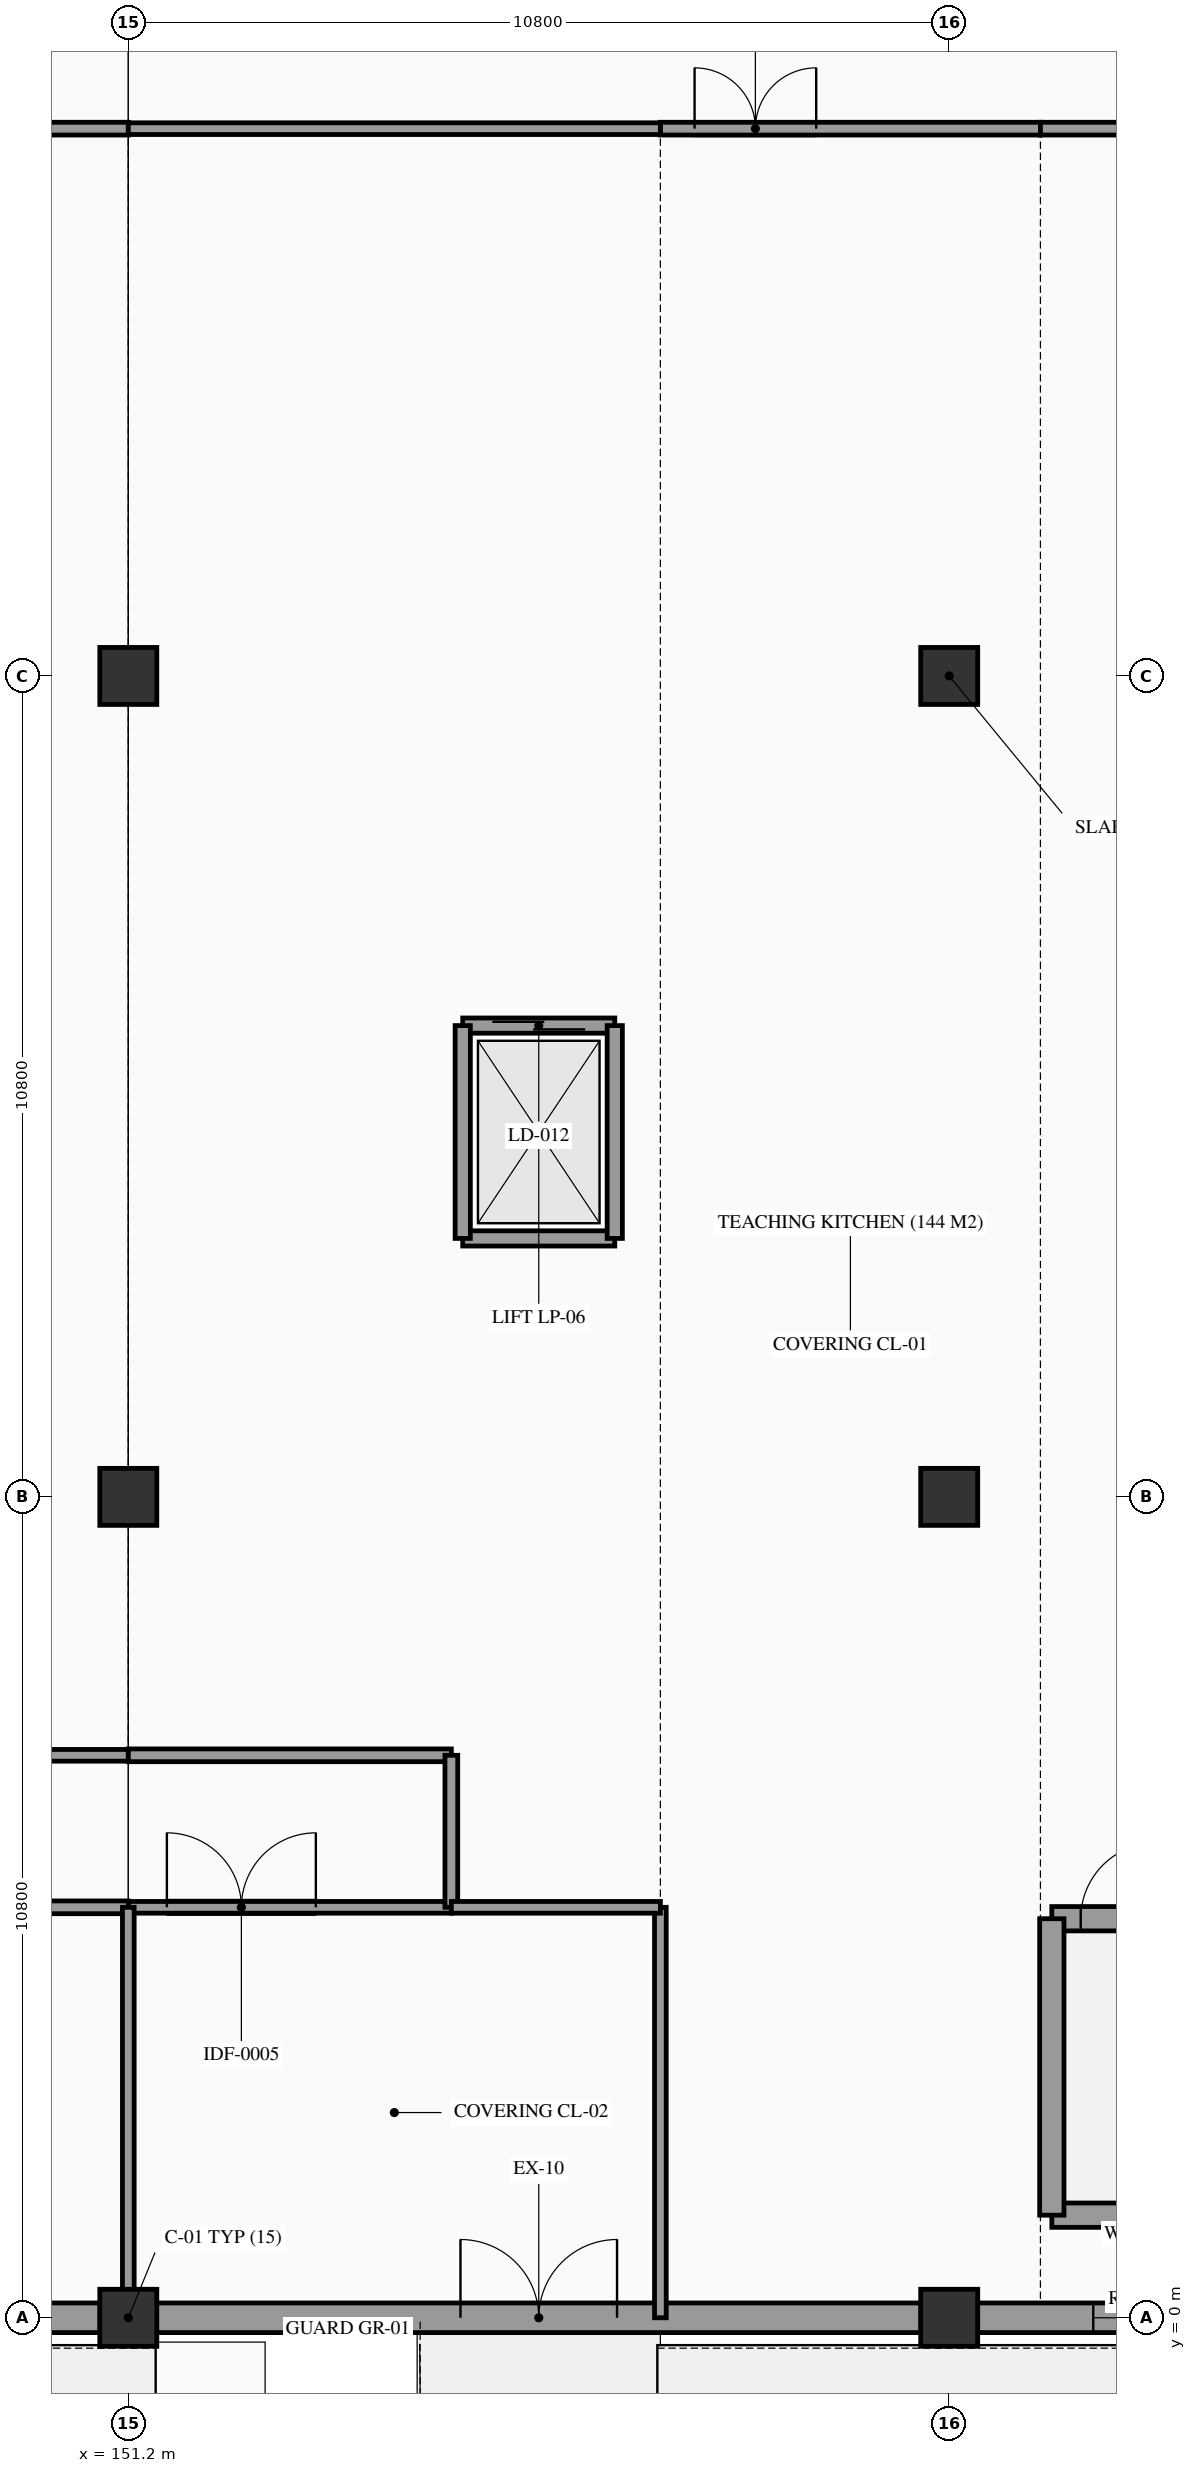
"""IFC4 building model, lengths in metres.
Left out: names, types, materials, properties, quantities, classifications, styles, units other than length and angle.
Written with IfcOpenShell. Run it as: python <this file> out.ifc"""

import sys

from ifc_helpers import new_model, si_unit, direction, frame, frame_2d, origin, origin_2d, place, context, subcontext, project, spatial, rectangle, extrude, element, fill, save


model = new_model("IFC4")
c1 = context("Model", 3, precision=1e-05, world=origin(), true_north=direction((0.0, 1.0)))
c2 = subcontext(c1, "Body", "Model", "MODEL_VIEW")
j1 = project(units=[si_unit("LENGTHUNIT", "METRE"), si_unit("PLANEANGLEUNIT", "RADIAN")], contexts=[c1])
p1 = place(None, origin())
s1 = spatial("IfcSite", under=j1, at=p1, CompositionType="ELEMENT")
p2 = place(p1, origin())
s2 = spatial("IfcBuilding", under=s1, at=p2, CompositionType="ELEMENT")
p3 = place(p2, origin())
s3 = spatial("IfcBuildingStorey", under=s2, at=p3, CompositionType="ELEMENT", Elevation=0.0)
for number, where, z_axis, x_axis in (
    (1, (151.2, 0.0, -1.2), (0.0, 0.0, 1.0), (1.0, 0.0, 0.0)),
    (2, (151.2, 10.8, -1.2), (0.0, 0.0, 1.0), (1.0, 0.0, 0.0)),
    (3, (151.2, 21.6, -1.2), (0.0, 0.0, 1.0), (1.0, 0.0, 0.0)),
    (4, (162.0, 0.0, -1.2), (0.0, 0.0, 1.0), (1.0, 0.0, 0.0)),
    (5, (162.0, 10.8, -1.2), (0.0, 0.0, 1.0), (1.0, 0.0, 0.0)),
    (6, (162.0, 21.6, -1.2), (0.0, 0.0, 1.0), (1.0, 0.0, 0.0)),
):
    element("IfcColumn", number, at=place(p3, frame(where, z_axis=z_axis, x_axis=x_axis)), inside=s3, PredefinedType="COLUMN", context=c2, shape_type="SweptSolid", body=[
        extrude(rectangle(XDim=0.75, YDim=0.75, at=origin_2d()), origin(), (0.0, 0.0, 1.0), 6.6),
    ])
p4 = place(p3, frame((108.45, 0.0, -1.2), z_axis=(0.0, 0.0, 1.0), x_axis=(1.0, 0.0, 0.0)))
e7 = element("IfcWall", 7, at=p4, inside=s3, PredefinedType="USERDEFINED", context=c2, shape_type="SweptSolid", body=[
    extrude(rectangle(XDim=107.1, YDim=0.334, at=frame_2d((53.55, 0.0))), origin(), (0.0, 0.0, 1.0), 0.14),
])
p5 = place(p3, frame((140.77, 0.0, 0.0), z_axis=(0.0, 0.0, 1.0), x_axis=(1.0, 0.0, 0.0)))
e8 = element("IfcWall", 8, at=p5, inside=s3, PredefinedType="STANDARD", context=c2, shape_type="SweptSolid", body=[
    extrude(rectangle(XDim=10.06, YDim=0.39, at=frame_2d((5.03, 0.0))), origin(), (0.0, 0.0, 1.0), 4.198),
])
p6 = place(p5, frame((1.225, 0.0, 0.95)))
e9 = element("IfcOpeningElement", 9, at=p6, cuts=e8, PredefinedType="OPENING", context=c2, shape_type="SweptSolid", body=[
    extrude(rectangle(XDim=1.65, YDim=1.2, at=frame_2d((0.825, 0.6))), frame((0.0, 0.205, 0.0), z_axis=(0.0, -1.0, 0.0), x_axis=(1.0, 0.0, 0.0)), (0.0, 0.0, 1.0), 0.41),
])
p7 = place(p5, frame((4.095, 0.0, 0.95)))
e10 = element("IfcOpeningElement", 10, at=p7, cuts=e8, PredefinedType="OPENING", context=c2, shape_type="SweptSolid", body=[
    extrude(rectangle(XDim=1.77, YDim=1.2, at=frame_2d((0.885, 0.6))), frame((0.0, 0.205, 0.0), z_axis=(0.0, -1.0, 0.0), x_axis=(1.0, 0.0, 0.0)), (0.0, 0.0, 1.0), 0.41),
])
p8 = place(p5, frame((6.965, 0.0, 0.95)))
e11 = element("IfcOpeningElement", 11, at=p8, cuts=e8, PredefinedType="OPENING", context=c2, shape_type="SweptSolid", body=[
    extrude(rectangle(XDim=1.89, YDim=1.2, at=frame_2d((0.945, 0.6))), frame((0.0, 0.205, 0.0), z_axis=(0.0, -1.0, 0.0), x_axis=(1.0, 0.0, 0.0)), (0.0, 0.0, 1.0), 0.41),
])
p9 = place(p3, frame((151.57, 0.0, 0.0), z_axis=(0.0, 0.0, 1.0), x_axis=(1.0, 0.0, 0.0)))
e12 = element("IfcWall", 12, at=p9, inside=s3, PredefinedType="STANDARD", context=c2, shape_type="SweptSolid", body=[
    extrude(rectangle(XDim=10.06, YDim=0.39, at=frame_2d((5.03, 0.0))), origin(), (0.0, 0.0, 1.0), 4.198),
])
p10 = place(p9, frame((4.0, 0.0, 0.0)))
e13 = element("IfcOpeningElement", 13, at=p10, cuts=e12, PredefinedType="OPENING", context=c2, shape_type="SweptSolid", body=[
    extrude(rectangle(XDim=2.06, YDim=2.4, at=frame_2d((1.03, 1.2))), frame((0.0, 0.205, 0.0), z_axis=(0.0, -1.0, 0.0), x_axis=(1.0, 0.0, 0.0)), (0.0, 0.0, 1.0), 0.41),
])
p11 = place(p3, frame((162.37, 0.0, 0.0), z_axis=(0.0, 0.0, 1.0), x_axis=(1.0, 0.0, 0.0)))
e14 = element("IfcWall", 14, at=p11, inside=s3, PredefinedType="STANDARD", context=c2, shape_type="SweptSolid", body=[
    extrude(rectangle(XDim=10.06, YDim=0.39, at=frame_2d((5.03, 0.0))), origin(), (0.0, 0.0, 1.0), 4.198),
])
p12 = place(p11, frame((1.525, 0.0, 0.95)))
e15 = element("IfcOpeningElement", 15, at=p12, cuts=e14, PredefinedType="OPENING", context=c2, shape_type="SweptSolid", body=[
    extrude(rectangle(XDim=1.05, YDim=1.35, at=frame_2d((0.525, 0.675))), frame((0.0, 0.205, 0.0), z_axis=(0.0, -1.0, 0.0), x_axis=(1.0, 0.0, 0.0)), (0.0, 0.0, 1.0), 0.41),
])
p13 = place(p11, frame((4.395, 0.0, 0.95)))
e16 = element("IfcOpeningElement", 16, at=p13, cuts=e14, PredefinedType="OPENING", context=c2, shape_type="SweptSolid", body=[
    extrude(rectangle(XDim=1.17, YDim=1.35, at=frame_2d((0.585, 0.675))), frame((0.0, 0.205, 0.0), z_axis=(0.0, -1.0, 0.0), x_axis=(1.0, 0.0, 0.0)), (0.0, 0.0, 1.0), 0.41),
])
p14 = place(p11, frame((7.265, 0.0, 0.95)))
e17 = element("IfcOpeningElement", 17, at=p14, cuts=e14, PredefinedType="OPENING", context=c2, shape_type="SweptSolid", body=[
    extrude(rectangle(XDim=1.29, YDim=1.35, at=frame_2d((0.645, 0.675))), frame((0.0, 0.205, 0.0), z_axis=(0.0, -1.0, 0.0), x_axis=(1.0, 0.0, 0.0)), (0.0, 0.0, 1.0), 0.41),
])
p15 = place(p3, frame((163.35, 1.35, 0.0), z_axis=(0.0, 0.0, 1.0), x_axis=(1.0, 0.0, 0.0)))
e18 = element("IfcWall", 18, at=p15, inside=s3, PredefinedType="SHEAR", context=c2, shape_type="SweptSolid", body=[
    extrude(rectangle(XDim=7.9, YDim=0.32, at=frame_2d((3.95, 0.0))), origin(), (0.0, 0.0, 1.0), 5.4),
])
p16 = place(p3, frame((163.35, 5.25, 0.0), z_axis=(0.0, 0.0, 1.0), x_axis=(1.0, 0.0, 0.0)))
e19 = element("IfcWall", 19, at=p16, inside=s3, PredefinedType="SHEAR", context=c2, shape_type="SweptSolid", body=[
    extrude(rectangle(XDim=7.9, YDim=0.32, at=frame_2d((3.95, 0.0))), origin(), (0.0, 0.0, 1.0), 5.4),
])
p17 = place(p16, frame((0.38, 0.0, 0.0)))
e20 = element("IfcOpeningElement", 20, at=p17, cuts=e19, PredefinedType="OPENING", context=c2, shape_type="SweptSolid", body=[
    extrude(rectangle(XDim=1.0, YDim=2.15, at=frame_2d((0.5, 1.075))), frame((0.0, 0.17, 0.0), z_axis=(0.0, -1.0, 0.0), x_axis=(1.0, 0.0, 0.0)), (0.0, 0.0, 1.0), 0.34),
])
p18 = place(p3, frame((163.35, 1.35, 0.0), z_axis=(0.0, 0.0, 1.0), x_axis=(0.0, 1.0, 0.0)))
e21 = element("IfcWall", 21, at=p18, inside=s3, PredefinedType="SHEAR", context=c2, shape_type="SweptSolid", body=[
    extrude(rectangle(XDim=3.9, YDim=0.32, at=frame_2d((1.95, 0.0))), origin(), (0.0, 0.0, 1.0), 5.4),
])
p19 = place(p3, frame((155.6, 14.2, 0.0), z_axis=(0.0, 0.0, 1.0), x_axis=(1.0, 0.0, 0.0)))
e22 = element("IfcWall", 22, at=p19, inside=s3, PredefinedType="SOLIDWALL", context=c2, shape_type="SweptSolid", body=[
    extrude(rectangle(XDim=2.0, YDim=0.2, at=frame_2d((1.0, 0.0))), origin(), (0.0, 0.0, 1.0), 4.22),
])
p20 = place(p3, frame((155.6, 17.0, 0.0), z_axis=(0.0, 0.0, 1.0), x_axis=(1.0, 0.0, 0.0)))
e23 = element("IfcWall", 23, at=p20, inside=s3, PredefinedType="SOLIDWALL", context=c2, shape_type="SweptSolid", body=[
    extrude(rectangle(XDim=2.0, YDim=0.2, at=frame_2d((1.0, 0.0))), origin(), (0.0, 0.0, 1.0), 4.22),
])
p21 = place(p20, frame((0.39, 0.0, 0.0)))
e24 = element("IfcOpeningElement", 24, at=p21, cuts=e23, PredefinedType="OPENING", context=c2, shape_type="SweptSolid", body=[
    extrude(rectangle(XDim=1.22, YDim=2.2, at=frame_2d((0.61, 1.1))), frame((0.0, 0.11, 0.0), z_axis=(0.0, -1.0, 0.0), x_axis=(1.0, 0.0, 0.0)), (0.0, 0.0, 1.0), 0.22),
])
for number, where, z_axis, x_axis in (
    (25, (155.6, 14.2, 0.0), (0.0, 0.0, 1.0), (0.0, 1.0, 0.0)),
    (26, (157.6, 14.2, 0.0), (0.0, 0.0, 1.0), (0.0, 1.0, 0.0)),
):
    element("IfcWall", number, at=place(p3, frame(where, z_axis=z_axis, x_axis=x_axis)), inside=s3, PredefinedType="SOLIDWALL", context=c2, shape_type="SweptSolid", body=[
        extrude(rectangle(XDim=2.8, YDim=0.2, at=frame_2d((1.4, 0.0))), origin(), (0.0, 0.0, 1.0), 4.22),
    ])
p22 = place(p3, frame((151.2, 5.4, 0.0), z_axis=(0.0, 0.0, 1.0), x_axis=(1.0, 0.0, 0.0)))
e27 = element("IfcWall", 27, at=p22, inside=s3, PredefinedType="PARTITIONING", context=c2, shape_type="SweptSolid", body=[
    extrude(rectangle(XDim=4.25, YDim=0.154, at=frame_2d((2.125, 0.0))), origin(), (0.0, 0.0, 1.0), 3.95),
])
p23 = place(p22, frame((0.508, 0.0, 0.0)))
e28 = element("IfcOpeningElement", 28, at=p23, cuts=e27, PredefinedType="OPENING", context=c2, shape_type="SweptSolid", body=[
    extrude(rectangle(XDim=1.96, YDim=2.3, at=frame_2d((0.98, 1.15))), frame((0.0, 0.087, 0.0), z_axis=(0.0, -1.0, 0.0), x_axis=(1.0, 0.0, 0.0)), (0.0, 0.0, 1.0), 0.174),
])
p24 = place(p3, frame((129.6, 7.4, 0.0), z_axis=(0.0, 0.0, 1.0), x_axis=(1.0, 0.0, 0.0)))
e29 = element("IfcWall", 29, at=p24, inside=s3, PredefinedType="PARTITIONING", context=c2, shape_type="SweptSolid", body=[
    extrude(rectangle(XDim=21.6, YDim=0.154, at=frame_2d((10.8, 0.0))), origin(), (0.0, 0.0, 1.0), 3.95),
])
p25 = place(p3, frame((129.6, 28.8, 0.0), z_axis=(0.0, 0.0, 1.0), x_axis=(1.0, 0.0, 0.0)))
e30 = element("IfcWall", 30, at=p25, inside=s3, PredefinedType="PARTITIONING", context=c2, shape_type="SweptSolid", body=[
    extrude(rectangle(XDim=21.6, YDim=0.168, at=frame_2d((10.8, 0.0))), origin(), (0.0, 0.0, 1.0), 3.95),
])
p26 = place(p25, frame((18.098, 0.0, 0.0)))
e31 = element("IfcOpeningElement", 31, at=p26, cuts=e30, PredefinedType="OPENING", context=c2, shape_type="SweptSolid", body=[
    extrude(rectangle(XDim=1.82, YDim=2.25, at=frame_2d((0.91, 1.125))), frame((0.0, 0.094, 0.0), z_axis=(0.0, -1.0, 0.0), x_axis=(1.0, 0.0, 0.0)), (0.0, 0.0, 1.0), 0.188),
])
p27 = place(p3, frame((158.2, 0.0, 0.0), z_axis=(0.0, 0.0, 1.0), x_axis=(0.0, 1.0, 0.0)))
e32 = element("IfcWall", 32, at=p27, inside=s3, PredefinedType="PARTITIONING", context=c2, shape_type="SweptSolid", body=[
    extrude(rectangle(XDim=5.4, YDim=0.154, at=frame_2d((2.7, 0.0))), origin(), (0.0, 0.0, 1.0), 3.95),
])
p28 = place(p3, frame((158.2, 28.8, 0.0), z_axis=(0.0, 0.0, 1.0), x_axis=(1.0, 0.0, 0.0)))
e33 = element("IfcWall", 33, at=p28, inside=s3, PredefinedType="PARTITIONING", context=c2, shape_type="SweptSolid", body=[
    extrude(rectangle(XDim=5.0, YDim=0.168, at=frame_2d((2.5, 0.0))), origin(), (0.0, 0.0, 1.0), 3.95),
])
p29 = place(p28, frame((0.45, 0.0, 0.0)))
e34 = element("IfcOpeningElement", 34, at=p29, cuts=e33, PredefinedType="OPENING", context=c2, shape_type="SweptSolid", body=[
    extrude(rectangle(XDim=1.6, YDim=2.2, at=frame_2d((0.8, 1.1))), frame((0.0, 0.094, 0.0), z_axis=(0.0, -1.0, 0.0), x_axis=(1.0, 0.0, 0.0)), (0.0, 0.0, 1.0), 0.188),
])
p30 = place(p3, frame((149.27, 5.4, 0.0), z_axis=(0.0, 0.0, 1.0), x_axis=(1.0, 0.0, 0.0)))
e35 = element("IfcWall", 35, at=p30, inside=s3, PredefinedType="PARTITIONING", context=c2, shape_type="SweptSolid", body=[
    extrude(rectangle(XDim=1.93, YDim=0.168, at=frame_2d((0.965, 0.0))), origin(), (0.0, 0.0, 1.0), 3.95),
])
p31 = place(p3, frame((151.2, 0.0, 0.0), z_axis=(0.0, 0.0, 1.0), x_axis=(0.0, 1.0, 0.0)))
e36 = element("IfcWall", 36, at=p31, inside=s3, PredefinedType="PARTITIONING", context=c2, shape_type="SweptSolid", body=[
    extrude(rectangle(XDim=5.4, YDim=0.154, at=frame_2d((2.7, 0.0))), origin(), (0.0, 0.0, 1.0), 3.95),
])
p32 = place(p3, frame((151.2, 7.4, 0.0), z_axis=(0.0, 0.0, 1.0), x_axis=(1.0, 0.0, 0.0)))
e37 = element("IfcWall", 37, at=p32, inside=s3, PredefinedType="PARTITIONING", context=c2, shape_type="SweptSolid", body=[
    extrude(rectangle(XDim=4.25, YDim=0.168, at=frame_2d((2.125, 0.0))), origin(), (0.0, 0.0, 1.0), 3.95),
])
p33 = place(p3, frame((151.2, 28.8, 0.0), z_axis=(0.0, 0.0, 1.0), x_axis=(1.0, 0.0, 0.0)))
e38 = element("IfcWall", 38, at=p33, inside=s3, PredefinedType="PARTITIONING", context=c2, shape_type="SweptSolid", body=[
    extrude(rectangle(XDim=7.0, YDim=0.154, at=frame_2d((3.5, 0.0))), origin(), (0.0, 0.0, 1.0), 3.95),
])
p34 = place(p3, frame((155.45, 5.4, 0.0), z_axis=(0.0, 0.0, 1.0), x_axis=(0.0, 1.0, 0.0)))
e39 = element("IfcWall", 39, at=p34, inside=s3, PredefinedType="PARTITIONING", context=c2, shape_type="SweptSolid", body=[
    extrude(rectangle(XDim=2.0, YDim=0.168, at=frame_2d((1.0, 0.0))), origin(), (0.0, 0.0, 1.0), 3.95),
])
p35 = place(p3, frame((155.45, 5.4, 0.0), z_axis=(0.0, 0.0, 1.0), x_axis=(1.0, 0.0, 0.0)))
e40 = element("IfcWall", 40, at=p35, inside=s3, PredefinedType="PARTITIONING", context=c2, shape_type="SweptSolid", body=[
    extrude(rectangle(XDim=2.75, YDim=0.154, at=frame_2d((1.375, 0.0))), origin(), (0.0, 0.0, 1.0), 3.95),
])
p36 = place(p3, frame((163.2, 28.8, 0.0), z_axis=(0.0, 0.0, 1.0), x_axis=(1.0, 0.0, 0.0)))
e41 = element("IfcWall", 41, at=p36, inside=s3, PredefinedType="PARTITIONING", context=c2, shape_type="SweptSolid", body=[
    extrude(rectangle(XDim=9.6, YDim=0.168, at=frame_2d((4.8, 0.0))), origin(), (0.0, 0.0, 1.0), 3.95),
])
p37 = place(p10, frame((2.06, 0.0, 0.0), z_axis=(0.0, 0.0, 1.0), x_axis=(-1.0, 0.0, 0.0)))
e42 = element("IfcDoor", 42, at=p37, inside=s3, OperationType="DOUBLE_DOOR_SINGLE_SWING", PredefinedType="DOOR", context=c2, shape_type="SweptSolid", body=[
    extrude(rectangle(XDim=2.06, YDim=2.4, at=frame_2d((1.03, 1.2))), frame((0.0, 0.025, 0.0), z_axis=(0.0, -1.0, 0.0), x_axis=(1.0, 0.0, 0.0)), (0.0, 0.0, 1.0), 0.05),
])
fill(e13, e42)
p38 = place(p12, frame((1.05, 0.0, 0.0), z_axis=(0.0, 0.0, 1.0), x_axis=(-1.0, 0.0, 0.0)))
e43 = element("IfcWindow", 43, at=p38, inside=s3, PartitioningType="SINGLE_PANEL", PredefinedType="WINDOW", context=c2, shape_type="SweptSolid", body=[
    extrude(rectangle(XDim=1.05, YDim=1.35, at=frame_2d((0.525, 0.675))), frame((0.0, 0.03, 0.0), z_axis=(0.0, -1.0, 0.0), x_axis=(1.0, 0.0, 0.0)), (0.0, 0.0, 1.0), 0.06),
])
fill(e15, e43)
p39 = place(p17, frame((1.0, 0.0, 0.0), z_axis=(0.0, 0.0, 1.0), x_axis=(-1.0, 0.0, 0.0)))
e44 = element("IfcDoor", 44, at=p39, inside=s3, OperationType="SINGLE_SWING_RIGHT", PredefinedType="DOOR", context=c2, shape_type="SweptSolid", body=[
    extrude(rectangle(XDim=1.0, YDim=2.15, at=frame_2d((0.5, 1.075))), frame((0.0, 0.025, 0.0), z_axis=(0.0, -1.0, 0.0), x_axis=(1.0, 0.0, 0.0)), (0.0, 0.0, 1.0), 0.05),
])
fill(e20, e44)
p40 = place(p21, origin())
e45 = element("IfcDoor", 45, at=p40, inside=s3, OperationType="DOUBLE_DOOR_SLIDING", PredefinedType="DOOR", context=c2, shape_type="SweptSolid", body=[
    extrude(rectangle(XDim=1.22, YDim=2.2, at=frame_2d((0.61, 1.1))), frame((0.0, 0.025, 0.0), z_axis=(0.0, -1.0, 0.0), x_axis=(1.0, 0.0, 0.0)), (0.0, 0.0, 1.0), 0.05),
])
fill(e24, e45)
p41 = place(p23, origin())
e46 = element("IfcDoor", 46, at=p41, inside=s3, OperationType="DOUBLE_DOOR_SINGLE_SWING", PredefinedType="DOOR", context=c2, shape_type="SweptSolid", body=[
    extrude(rectangle(XDim=1.96, YDim=2.3, at=frame_2d((0.98, 1.15))), frame((0.0, 0.025, 0.0), z_axis=(0.0, -1.0, 0.0), x_axis=(1.0, 0.0, 0.0)), (0.0, 0.0, 1.0), 0.05),
])
fill(e28, e46)
p42 = place(p29, origin())
e47 = element("IfcDoor", 47, at=p42, inside=s3, OperationType="DOUBLE_DOOR_SINGLE_SWING", PredefinedType="DOOR", context=c2, shape_type="SweptSolid", body=[
    extrude(rectangle(XDim=1.6, YDim=2.2, at=frame_2d((0.8, 1.1))), frame((0.0, 0.025, 0.0), z_axis=(0.0, -1.0, 0.0), x_axis=(1.0, 0.0, 0.0)), (0.0, 0.0, 1.0), 0.05),
])
fill(e34, e47)
save(model, sys.argv[1])
